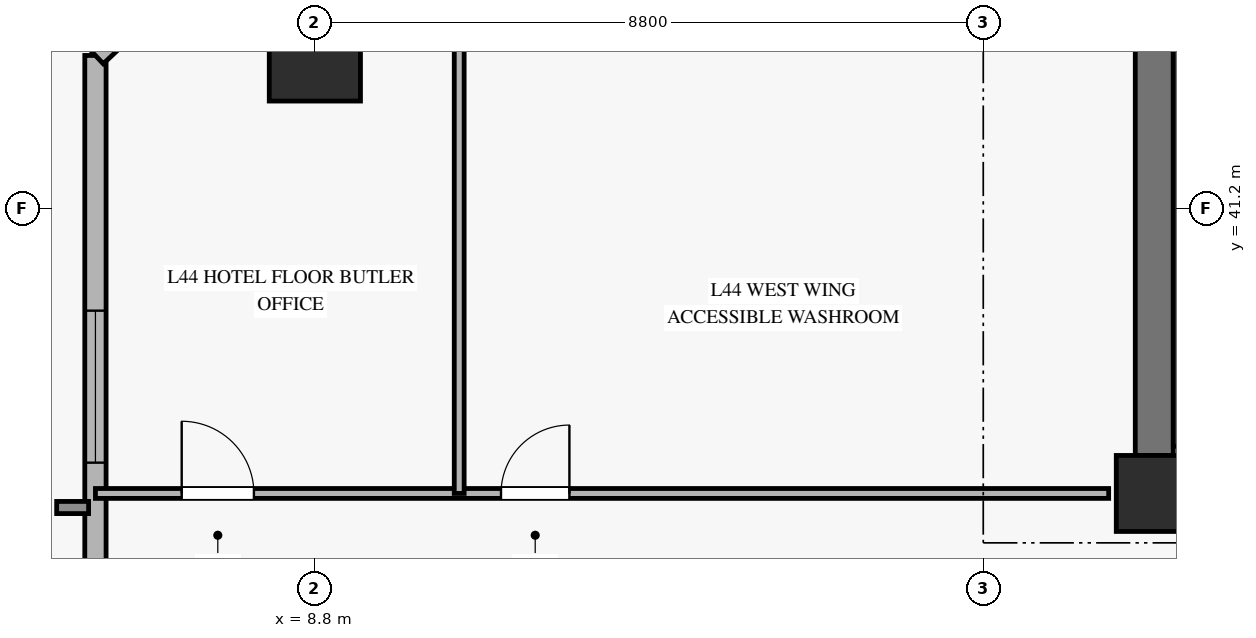
"""IFC4 building model, lengths in metres.
Left out: names, types, materials, properties, quantities, classifications, styles, units other than length and angle.
Written with IfcOpenShell. Run it as: python <this file> out.ifc"""

import sys

from ifc_helpers import new_model, si_unit, direction, frame, frame_2d, origin, origin_2d, place, context, subcontext, project, spatial, rectangle, hollow_rectangle, extrude, source, transform, mapped, element, fill, save


model = new_model("IFC4")
c1 = context("Model", 3, precision=1e-05, world=origin(), true_north=direction((0.0, 1.0)))
c2 = subcontext(c1, "Body", "Model", "MODEL_VIEW")
j1 = project(units=[si_unit("LENGTHUNIT", "METRE"), si_unit("PLANEANGLEUNIT", "RADIAN")], contexts=[c1])
p1 = place(None, origin())
s1 = spatial("IfcSite", under=j1, at=p1, CompositionType="ELEMENT")
p2 = place(p1, origin())
s2 = spatial("IfcBuilding", under=s1, at=p2, CompositionType="ELEMENT")
p3 = place(p2, frame((0.0, 0.0, 177.2)))
s3 = spatial("IfcBuildingStorey", under=s2, at=p3, CompositionType="ELEMENT", Elevation=177.2)
m1 = source(origin(), c2, "Body", "SweptSolid", [
    extrude(rectangle(XDim=1.0, YDim=1.0, at=origin_2d()), origin(), (0.0, 0.0, 1.0), 3.27),
])
p4 = place(p3, frame((19.85, 37.45, 0.0), z_axis=(0.0, 0.0, 1.0), x_axis=(1.0, 0.0, 0.0)))
e1 = element("IfcColumn", 1, at=p4, inside=s3, PredefinedType="PILASTER", context=c2, shape_type="MappedRepresentation", body=[
    mapped(m1, transform((0.0, 0.0, 0.0), x_axis=(1.0, 0.0, 0.0), y_axis=(0.0, 1.0, 0.0), z_axis=(0.0, 0.0, 1.0), scale=1.0)),
])
p5 = place(p3, frame((19.85, 37.95, 0.0), z_axis=(0.0, 0.0, 1.0), x_axis=(0.0, 1.0, 0.0)))
e2 = element("IfcWall", 2, at=p5, inside=s3, PredefinedType="SHEAR", context=c2, shape_type="SweptSolid", body=[
    extrude(rectangle(XDim=8.1, YDim=0.5, at=frame_2d((4.05, 0.0))), origin(), (0.0, 0.0, 1.0), 3.27),
])
m2 = source(origin(), c2, "Body", "SweptSolid", [
    extrude(hollow_rectangle(XDim=1.2, YDim=1.2, WallThickness=0.055, at=origin_2d()), origin(), (0.0, 0.0, 1.0), 3.277),
])
p6 = place(p3, frame((8.806, 43.213, 0.0), z_axis=(0.063777069764, 0.007972133721, 0.997932327594), x_axis=(-0.124034734589, 0.992277876714, 0.0)))
e3 = element("IfcColumn", 3, at=p6, inside=s3, PredefinedType="COLUMN", context=c2, shape_type="MappedRepresentation", body=[
    mapped(m2, transform((0.0, 0.0, 0.0), x_axis=(1.0, 0.0, 0.0), y_axis=(0.0, 1.0, 0.0), z_axis=(0.0, 0.0, 1.0), scale=1.0)),
])
p7 = place(p3, frame((5.919, 28.213, 0.0), z_axis=(0.0, 0.0, 1.0), x_axis=(0.0, 1.0, 0.0)))
e4 = element("IfcWall", 4, at=p7, inside=s3, PredefinedType="SOLIDWALL", context=c2, shape_type="SweptSolid", body=[
    extrude(rectangle(XDim=15.0, YDim=0.28, at=frame_2d((7.5, 0.0))), origin(), (0.0, 0.0, 1.0), 2.75),
])
p8 = place(p7, frame((9.642, 0.0, 0.45)))
e5 = element("IfcOpeningElement", 5, at=p8, cuts=e4, PredefinedType="OPENING", context=c2, shape_type="SweptSolid", body=[
    extrude(rectangle(XDim=2.0, YDim=2.0, at=frame_2d((1.0, 1.0))), frame((0.0, 0.15, 0.0), z_axis=(0.0, -1.0, 0.0), x_axis=(1.0, 0.0, 0.0)), (0.0, 0.0, 1.0), 0.3),
])
p9 = place(p3, frame((9.156, 46.25, 0.0), z_axis=(0.0, 0.0, 1.0), x_axis=(-0.729271287048, -0.684224663314, 0.0)))
e6 = element("IfcWall", 6, at=p9, inside=s3, PredefinedType="SOLIDWALL", context=c2, shape_type="SweptSolid", body=[
    extrude(rectangle(XDim=4.439, YDim=0.3, at=frame_2d((2.219, 0.0))), origin(), (0.0, 0.0, 1.0), 2.75),
])
p10 = place(p9, frame((1.419, 0.0, 0.45)))
e7 = element("IfcOpeningElement", 7, at=p10, cuts=e6, PredefinedType="OPENING", context=c2, shape_type="SweptSolid", body=[
    extrude(rectangle(XDim=1.6, YDim=2.0, at=frame_2d((0.8, 1.0))), frame((0.0, 0.16, 0.0), z_axis=(0.0, -1.0, 0.0), x_axis=(1.0, 0.0, 0.0)), (0.0, 0.0, 1.0), 0.32),
])
p11 = place(p3, frame((20.17, 38.07, 0.0), z_axis=(0.0, 0.0, 1.0), x_axis=(0.0, 1.0, 0.0)))
e8 = element("IfcWall", 8, at=p11, inside=s3, PredefinedType="SOLIDWALL", context=c2, shape_type="SweptSolid", body=[
    extrude(rectangle(XDim=7.25, YDim=0.14, at=frame_2d((3.625, 0.0))), origin(), (0.0, 0.0, 1.0), 3.5),
])
p12 = place(p3, frame((5.919, 37.45, 0.0), z_axis=(0.0, 0.0, 1.0), x_axis=(1.0, 0.0, 0.0)))
e9 = element("IfcWall", 9, at=p12, inside=s3, PredefinedType="PARTITIONING", context=c2, shape_type="SweptSolid", body=[
    extrude(rectangle(XDim=13.331, YDim=0.13, at=frame_2d((6.666, 0.0))), origin(), (0.0, 0.0, 1.0), 2.755),
])
p13 = place(p12, frame((1.135, 0.0, 0.0)))
e10 = element("IfcOpeningElement", 10, at=p13, cuts=e9, PredefinedType="OPENING", context=c2, shape_type="SweptSolid", body=[
    extrude(rectangle(XDim=0.95, YDim=2.1, at=frame_2d((0.475, 1.05))), frame((0.0, 0.075, 0.0), z_axis=(0.0, -1.0, 0.0), x_axis=(1.0, 0.0, 0.0)), (0.0, 0.0, 1.0), 0.15),
])
p14 = place(p12, frame((5.336, 0.0, 0.0)))
e11 = element("IfcOpeningElement", 11, at=p14, cuts=e9, PredefinedType="OPENING", context=c2, shape_type="SweptSolid", body=[
    extrude(rectangle(XDim=0.9, YDim=2.1, at=frame_2d((0.45, 1.05))), frame((0.0, 0.075, 0.0), z_axis=(0.0, -1.0, 0.0), x_axis=(1.0, 0.0, 0.0)), (0.0, 0.0, 1.0), 0.15),
])
p15 = place(p3, frame((10.705, 37.45, 0.0), z_axis=(0.0, 0.0, 1.0), x_axis=(0.0, 1.0, 0.0)))
e12 = element("IfcWall", 12, at=p15, inside=s3, PredefinedType="PARTITIONING", context=c2, shape_type="SweptSolid", body=[
    extrude(rectangle(XDim=8.8, YDim=0.13, at=frame_2d((4.4, 0.0))), origin(), (0.0, 0.0, 1.0), 3.27),
])
m3 = source(origin(), c2, "Body", "SweptSolid", [
    extrude(rectangle(XDim=2.0, YDim=2.0, at=frame_2d((1.0, 1.0))), frame((0.0, 0.03, 0.0), z_axis=(0.0, -1.0, 0.0), x_axis=(1.0, 0.0, 0.0)), (0.0, 0.0, 1.0), 0.06),
])
p16 = place(p8, origin())
e13 = element("IfcWindow", 13, at=p16, inside=s3, PartitioningType="SINGLE_PANEL", PredefinedType="WINDOW", context=c2, shape_type="MappedRepresentation", body=[
    mapped(m3, transform((0.0, 0.0, 0.0), x_axis=(1.0, 0.0, 0.0), y_axis=(0.0, 1.0, 0.0), z_axis=(0.0, 0.0, 1.0), scale=1.0)),
])
fill(e5, e13)
m4 = source(origin(), c2, "Body", "SweptSolid", [
    extrude(rectangle(XDim=0.95, YDim=2.1, at=frame_2d((0.475, 1.05))), frame((0.0, 0.025, 0.0), z_axis=(0.0, -1.0, 0.0), x_axis=(1.0, 0.0, 0.0)), (0.0, 0.0, 1.0), 0.05),
])
p17 = place(p13, origin())
e14 = element("IfcDoor", 14, at=p17, inside=s3, OperationType="SINGLE_SWING_LEFT", PredefinedType="DOOR", context=c2, shape_type="MappedRepresentation", body=[
    mapped(m4, transform((0.0, 0.0, 0.0), x_axis=(1.0, 0.0, 0.0), y_axis=(0.0, 1.0, 0.0), z_axis=(0.0, 0.0, 1.0), scale=1.0)),
])
fill(e10, e14)
m5 = source(origin(), c2, "Body", "SweptSolid", [
    extrude(rectangle(XDim=0.9, YDim=2.1, at=frame_2d((0.45, 1.05))), frame((0.0, 0.025, 0.0), z_axis=(0.0, -1.0, 0.0), x_axis=(1.0, 0.0, 0.0)), (0.0, 0.0, 1.0), 0.05),
])
p18 = place(p14, origin())
e15 = element("IfcDoor", 15, at=p18, inside=s3, OperationType="SINGLE_SWING_RIGHT", PredefinedType="DOOR", context=c2, shape_type="MappedRepresentation", body=[
    mapped(m5, transform((0.0, 0.0, 0.0), x_axis=(1.0, 0.0, 0.0), y_axis=(0.0, 1.0, 0.0), z_axis=(0.0, 0.0, 1.0), scale=1.0)),
])
fill(e11, e15)
save(model, sys.argv[1])
